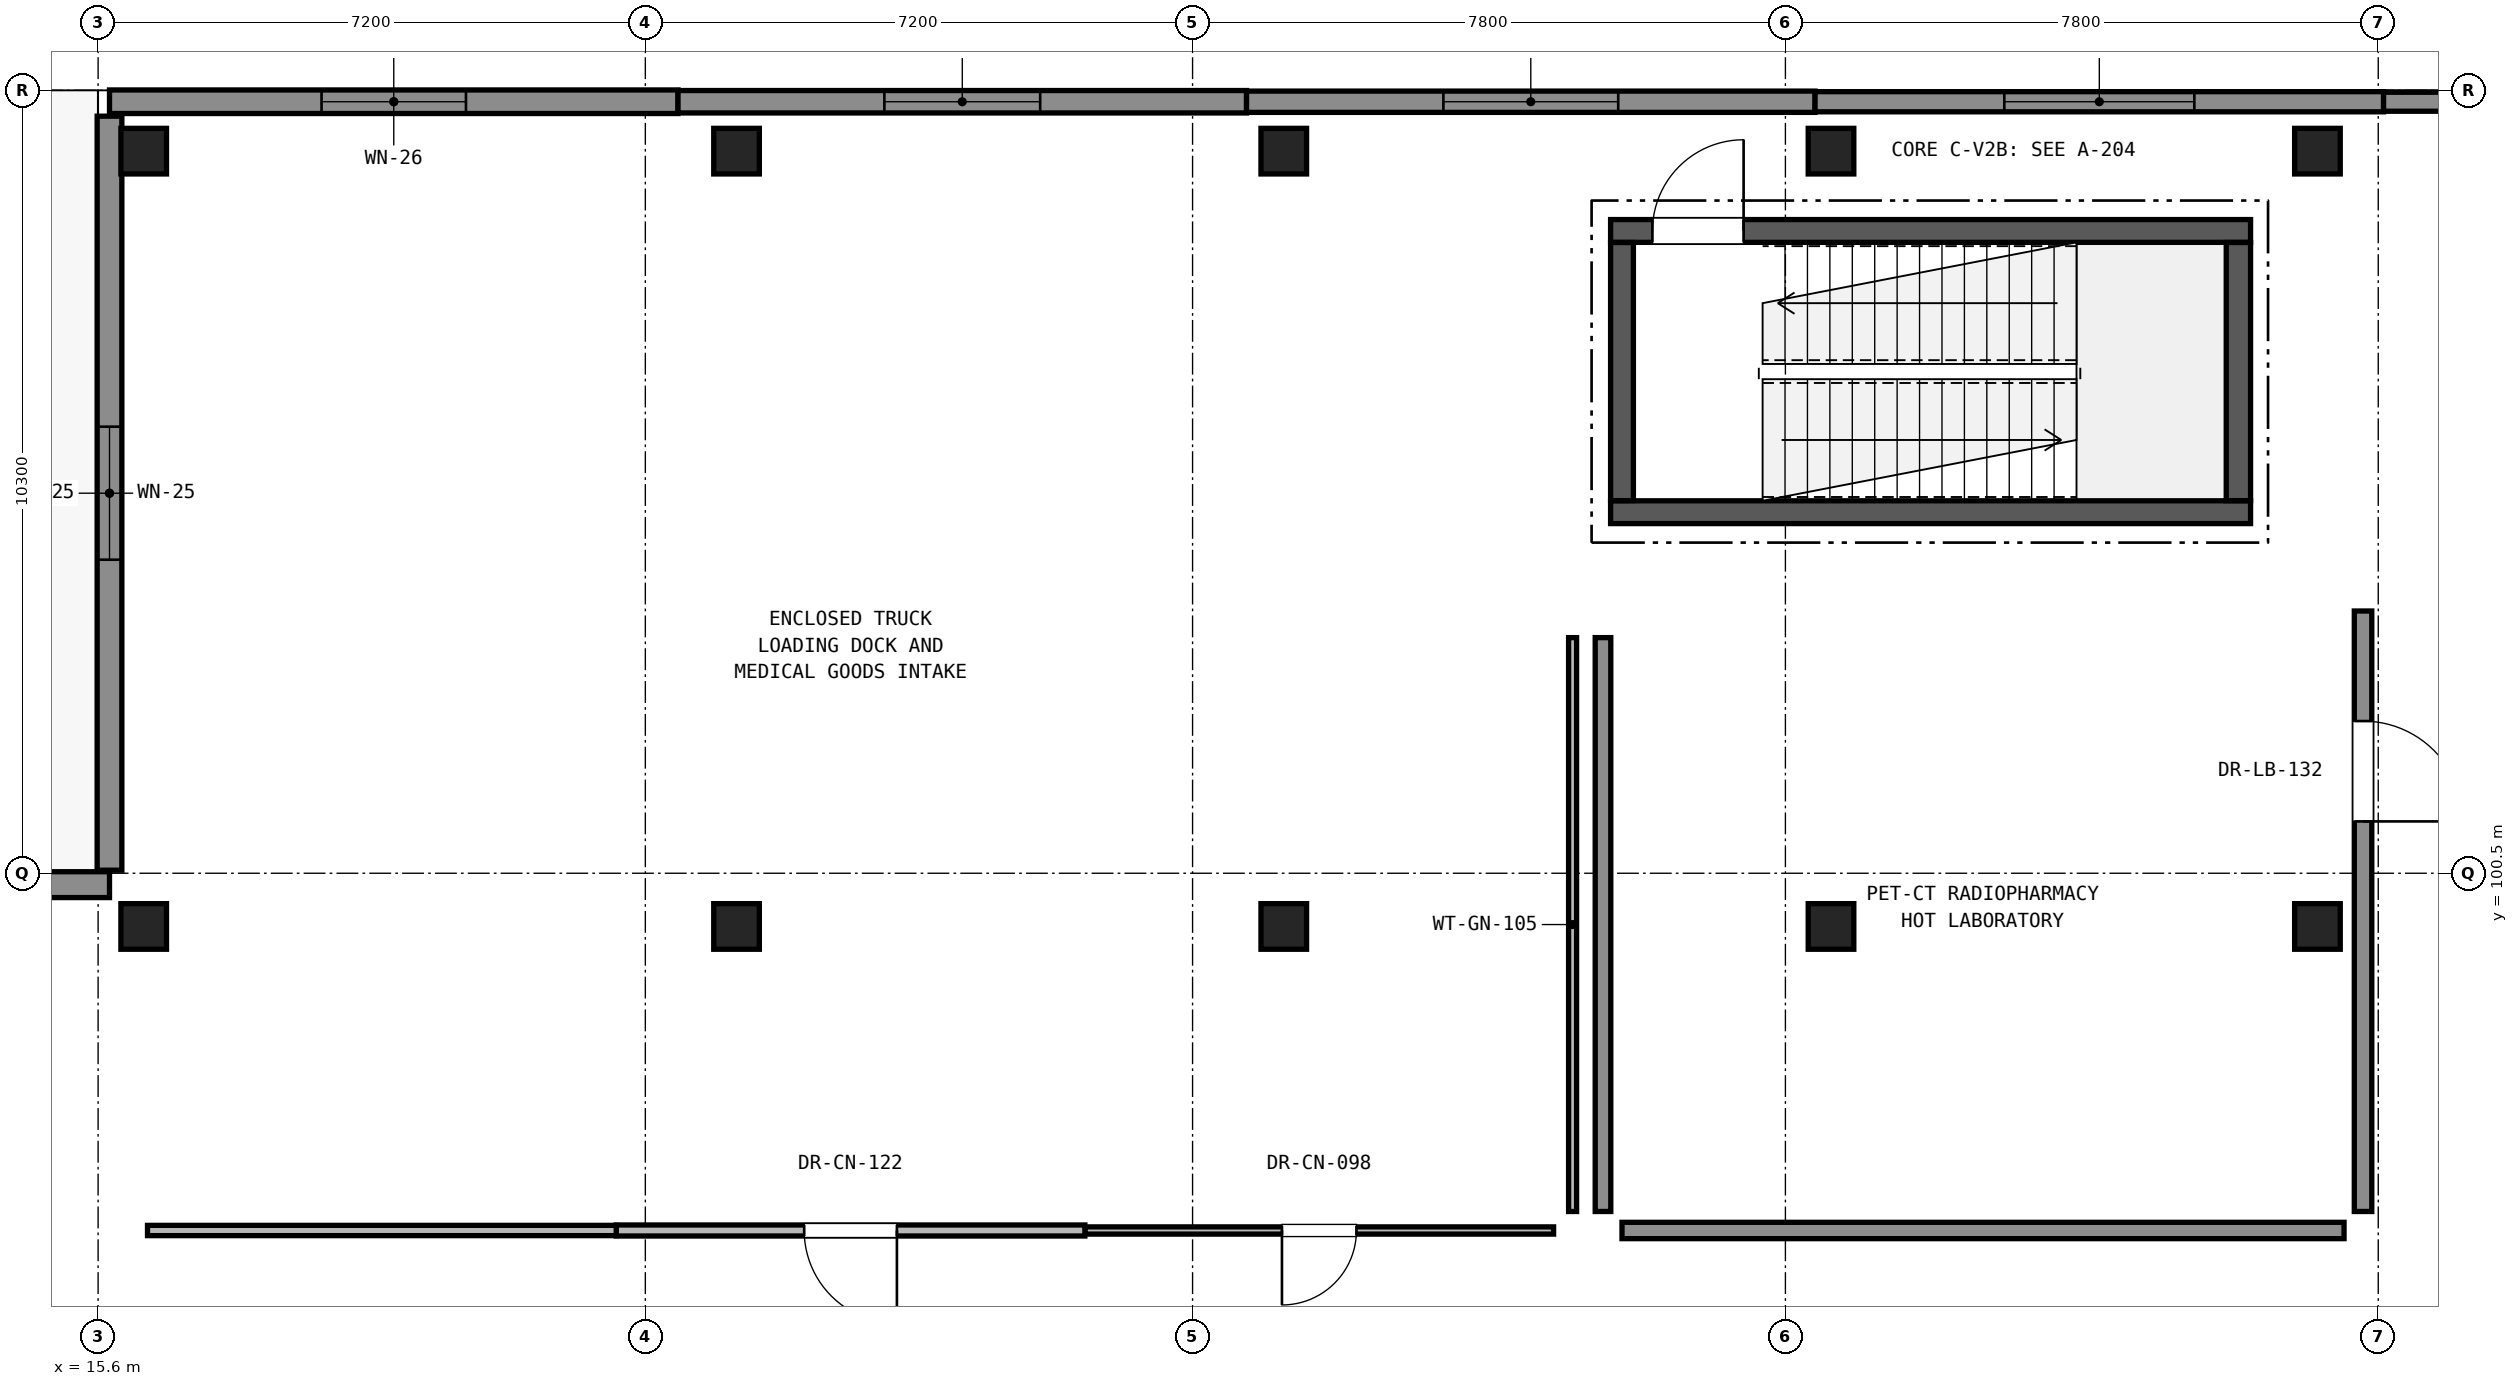
"""IFC4 building model, lengths in metres.
Left out: names, types, materials, properties, quantities, classifications, styles, units other than length and angle.
Written with IfcOpenShell. Run it as: python <this file> out.ifc"""

import sys

from ifc_helpers import new_model, si_unit, direction, frame, frame_2d, origin, origin_2d, place, context, subcontext, project, spatial, rectangle, extrude, element, fill, save


model = new_model("IFC4")
c1 = context("Model", 3, precision=1e-05, world=origin(), true_north=direction((0.0, 1.0)))
c2 = subcontext(c1, "Body", "Model", "MODEL_VIEW")
j1 = project(units=[si_unit("LENGTHUNIT", "METRE"), si_unit("PLANEANGLEUNIT", "RADIAN")], contexts=[c1])
p1 = place(None, origin())
s1 = spatial("IfcSite", under=j1, at=p1, CompositionType="ELEMENT")
p2 = place(p1, origin())
s2 = spatial("IfcBuilding", under=s1, at=p2, CompositionType="ELEMENT")
p3 = place(p2, origin())
s3 = spatial("IfcBuildingStorey", under=s2, at=p3, CompositionType="ELEMENT", Elevation=0.0)
for number, where, z_axis, x_axis in (
    (1, (16.2, 99.8, 0.0), (0.0, 0.0, 1.0), (1.0, 0.0, 0.0)),
    (2, (16.2, 110.0, 0.0), (0.0, 0.0, 1.0), (1.0, 0.0, 0.0)),
    (3, (24.0, 99.8, 0.0), (0.0, 0.0, 1.0), (1.0, 0.0, 0.0)),
    (4, (24.0, 110.0, 0.0), (0.0, 0.0, 1.0), (1.0, 0.0, 0.0)),
    (5, (31.2, 99.8, 0.0), (0.0, 0.0, 1.0), (1.0, 0.0, 0.0)),
    (6, (31.2, 110.0, 0.0), (0.0, 0.0, 1.0), (1.0, 0.0, 0.0)),
    (7, (38.4, 99.8, 0.0), (0.0, 0.0, 1.0), (1.0, 0.0, 0.0)),
    (8, (38.4, 110.0, 0.0), (0.0, 0.0, 1.0), (1.0, 0.0, 0.0)),
    (9, (44.8, 99.8, 0.0), (0.0, 0.0, 1.0), (1.0, 0.0, 0.0)),
    (10, (44.8, 110.0, 0.0), (0.0, 0.0, 1.0), (1.0, 0.0, 0.0)),
):
    element("IfcColumn", number, at=place(p3, frame(where, z_axis=z_axis, x_axis=x_axis)), inside=s3, PredefinedType="COLUMN", context=c2, shape_type="SweptSolid", body=[
        extrude(rectangle(XDim=0.6, YDim=0.6, at=origin_2d()), origin(), (0.0, 0.0, 1.0), 5.1),
    ])
p4 = place(p3, frame((7.95, 100.35, 0.0), z_axis=(0.0, 0.0, 1.0), x_axis=(1.0, 0.0, 0.0)))
e11 = element("IfcWall", 11, at=p4, inside=s3, PredefinedType="SOLIDWALL", context=c2, shape_type="SweptSolid", body=[
    extrude(rectangle(XDim=7.8, YDim=0.34, at=frame_2d((3.9, 0.0))), origin(), (0.0, 0.0, 1.0), 4.785),
])
p5 = place(p4, frame((2.6, 0.0, 0.0)))
e12 = element("IfcOpeningElement", 12, at=p5, cuts=e11, PredefinedType="OPENING", context=c2, shape_type="SweptSolid", body=[
    extrude(rectangle(XDim=2.6, YDim=2.8, at=frame_2d((1.3, 1.4))), frame((0.0, 0.18, 0.0), z_axis=(0.0, -1.0, 0.0), x_axis=(1.0, 0.0, 0.0)), (0.0, 0.0, 1.0), 0.36),
])
p6 = place(p3, frame((15.75, 100.54, 0.0), z_axis=(0.0, 0.0, 1.0), x_axis=(0.0, 1.0, 0.0)))
e13 = element("IfcWall", 13, at=p6, inside=s3, PredefinedType="SOLIDWALL", context=c2, shape_type="SweptSolid", body=[
    extrude(rectangle(XDim=9.92, YDim=0.325, at=frame_2d((4.96, 0.0))), origin(), (0.0, 0.0, 1.0), 4.785),
])
p7 = place(p6, frame((4.085, 0.0, 0.9)))
e14 = element("IfcOpeningElement", 14, at=p7, cuts=e13, PredefinedType="OPENING", context=c2, shape_type="SweptSolid", body=[
    extrude(rectangle(XDim=1.75, YDim=2.0, at=frame_2d((0.875, 1.0))), frame((0.0, 0.172, 0.0), z_axis=(0.0, -1.0, 0.0), x_axis=(1.0, 0.0, 0.0)), (0.0, 0.0, 1.0), 0.345),
])
p8 = place(p3, frame((15.75, 110.65, 0.0), z_axis=(0.0, 0.0, 1.0), x_axis=(1.0, 0.0, 0.0)))
e15 = element("IfcWall", 15, at=p8, inside=s3, PredefinedType="SOLIDWALL", context=c2, shape_type="SweptSolid", body=[
    extrude(rectangle(XDim=7.48, YDim=0.31, at=frame_2d((3.74, 0.0))), origin(), (0.0, 0.0, 1.0), 4.785),
])
p9 = place(p8, frame((2.79, 0.0, 0.9)))
e16 = element("IfcOpeningElement", 16, at=p9, cuts=e15, PredefinedType="OPENING", context=c2, shape_type="SweptSolid", body=[
    extrude(rectangle(XDim=1.9, YDim=2.0, at=frame_2d((0.95, 1.0))), frame((0.0, 0.165, 0.0), z_axis=(0.0, -1.0, 0.0), x_axis=(1.0, 0.0, 0.0)), (0.0, 0.0, 1.0), 0.33),
])
p10 = place(p3, frame((23.23, 110.65, 0.0), z_axis=(0.0, 0.0, 1.0), x_axis=(1.0, 0.0, 0.0)))
e17 = element("IfcWall", 17, at=p10, inside=s3, PredefinedType="SOLIDWALL", context=c2, shape_type="SweptSolid", body=[
    extrude(rectangle(XDim=7.48, YDim=0.295, at=frame_2d((3.74, 0.0))), origin(), (0.0, 0.0, 1.0), 4.785),
])
p11 = place(p10, frame((2.715, 0.0, 0.9)))
e18 = element("IfcOpeningElement", 18, at=p11, cuts=e17, PredefinedType="OPENING", context=c2, shape_type="SweptSolid", body=[
    extrude(rectangle(XDim=2.05, YDim=2.0, at=frame_2d((1.025, 1.0))), frame((0.0, 0.157, 0.0), z_axis=(0.0, -1.0, 0.0), x_axis=(1.0, 0.0, 0.0)), (0.0, 0.0, 1.0), 0.315),
])
p12 = place(p3, frame((30.71, 110.65, 0.0), z_axis=(0.0, 0.0, 1.0), x_axis=(1.0, 0.0, 0.0)))
e19 = element("IfcWall", 19, at=p12, inside=s3, PredefinedType="SOLIDWALL", context=c2, shape_type="SweptSolid", body=[
    extrude(rectangle(XDim=7.48, YDim=0.28, at=frame_2d((3.74, 0.0))), origin(), (0.0, 0.0, 1.0), 4.785),
])
p13 = place(p12, frame((2.59, 0.0, 0.9)))
e20 = element("IfcOpeningElement", 20, at=p13, cuts=e19, PredefinedType="OPENING", context=c2, shape_type="SweptSolid", body=[
    extrude(rectangle(XDim=2.3, YDim=2.0, at=frame_2d((1.15, 1.0))), frame((0.0, 0.15, 0.0), z_axis=(0.0, -1.0, 0.0), x_axis=(1.0, 0.0, 0.0)), (0.0, 0.0, 1.0), 0.3),
])
p14 = place(p3, frame((38.19, 110.65, 0.0), z_axis=(0.0, 0.0, 1.0), x_axis=(1.0, 0.0, 0.0)))
e21 = element("IfcWall", 21, at=p14, inside=s3, PredefinedType="SOLIDWALL", context=c2, shape_type="SweptSolid", body=[
    extrude(rectangle(XDim=7.48, YDim=0.265, at=frame_2d((3.74, 0.0))), origin(), (0.0, 0.0, 1.0), 4.785),
])
p15 = place(p14, frame((2.49, 0.0, 0.9)))
e22 = element("IfcOpeningElement", 22, at=p15, cuts=e21, PredefinedType="OPENING", context=c2, shape_type="SweptSolid", body=[
    extrude(rectangle(XDim=2.5, YDim=2.0, at=frame_2d((1.25, 1.0))), frame((0.0, 0.142, 0.0), z_axis=(0.0, -1.0, 0.0), x_axis=(1.0, 0.0, 0.0)), (0.0, 0.0, 1.0), 0.285),
])
p16 = place(p3, frame((45.67, 110.65, 0.0), z_axis=(0.0, 0.0, 1.0), x_axis=(1.0, 0.0, 0.0)))
e23 = element("IfcWall", 23, at=p16, inside=s3, PredefinedType="SOLIDWALL", context=c2, shape_type="SweptSolid", body=[
    extrude(rectangle(XDim=7.48, YDim=0.25, at=frame_2d((3.74, 0.0))), origin(), (0.0, 0.0, 1.0), 4.785),
])
p17 = place(p16, frame((2.99, 0.0, 0.9)))
e24 = element("IfcOpeningElement", 24, at=p17, cuts=e23, PredefinedType="OPENING", context=c2, shape_type="SweptSolid", body=[
    extrude(rectangle(XDim=1.5, YDim=2.2, at=frame_2d((0.75, 1.1))), frame((0.0, 0.135, 0.0), z_axis=(0.0, -1.0, 0.0), x_axis=(1.0, 0.0, 0.0)), (0.0, 0.0, 1.0), 0.27),
])
p18 = place(p3, frame((35.5, 105.25, 0.0), z_axis=(0.0, 0.0, 1.0), x_axis=(1.0, 0.0, 0.0)))
e25 = element("IfcWall", 25, at=p18, inside=s3, PredefinedType="SHEAR", context=c2, shape_type="SweptSolid", body=[
    extrude(rectangle(XDim=8.42, YDim=0.3, at=frame_2d((4.21, 0.0))), origin(), (0.0, 0.0, 1.0), 4.785),
])
p19 = place(p3, frame((35.5, 108.95, 0.0), z_axis=(0.0, 0.0, 1.0), x_axis=(1.0, 0.0, 0.0)))
e26 = element("IfcWall", 26, at=p19, inside=s3, PredefinedType="SHEAR", context=c2, shape_type="SweptSolid", body=[
    extrude(rectangle(XDim=8.42, YDim=0.3, at=frame_2d((4.21, 0.0))), origin(), (0.0, 0.0, 1.0), 4.785),
])
p20 = place(p19, frame((0.55, 0.0, 0.0)))
e27 = element("IfcOpeningElement", 27, at=p20, cuts=e26, PredefinedType="OPENING", context=c2, shape_type="SweptSolid", body=[
    extrude(rectangle(XDim=1.2, YDim=2.2, at=frame_2d((0.6, 1.1))), frame((0.0, 0.16, 0.0), z_axis=(0.0, -1.0, 0.0), x_axis=(1.0, 0.0, 0.0)), (0.0, 0.0, 1.0), 0.32),
])
p21 = place(p3, frame((35.65, 105.402, 0.0), z_axis=(0.0, 0.0, 1.0), x_axis=(0.0, 1.0, 0.0)))
e28 = element("IfcWall", 28, at=p21, inside=s3, PredefinedType="SHEAR", context=c2, shape_type="SweptSolid", body=[
    extrude(rectangle(XDim=3.396, YDim=0.3, at=frame_2d((1.698, 0.0))), origin(), (0.0, 0.0, 1.0), 4.785),
])
p22 = place(p3, frame((43.76, 105.402, 0.0), z_axis=(0.0, 0.0, 1.0), x_axis=(0.0, 1.0, 0.0)))
e29 = element("IfcWall", 29, at=p22, inside=s3, PredefinedType="SHEAR", context=c2, shape_type="SweptSolid", body=[
    extrude(rectangle(XDim=3.396, YDim=0.32, at=frame_2d((1.698, 0.0))), origin(), (0.0, 0.0, 1.0), 4.785),
])
p23 = place(p3, frame((35.0, 103.6, 0.0), z_axis=(0.0, 0.0, 1.0), x_axis=(0.0, -1.0, 0.0)))
e30 = element("IfcWall", 30, at=p23, inside=s3, PredefinedType="PARTITIONING", context=c2, shape_type="SweptSolid", body=[
    extrude(rectangle(XDim=7.55, YDim=0.105, at=frame_2d((3.775, 0.0))), origin(), (0.0, 0.0, 1.0), 4.425),
])
p24 = place(p3, frame((34.75, 95.8, 0.0), z_axis=(0.0, 0.0, 1.0), x_axis=(-1.0, 0.0, 0.0)))
e31 = element("IfcWall", 31, at=p24, inside=s3, PredefinedType="PARTITIONING", context=c2, shape_type="SweptSolid", body=[
    extrude(rectangle(XDim=6.167, YDim=0.095, at=frame_2d((3.083, 0.0))), origin(), (0.0, 0.0, 1.0), 4.135),
])
p25 = place(p24, frame((2.594, 0.0, 0.0)))
e32 = element("IfcOpeningElement", 32, at=p25, cuts=e31, PredefinedType="OPENING", context=c2, shape_type="SweptSolid", body=[
    extrude(rectangle(XDim=0.98, YDim=2.15, at=frame_2d((0.49, 1.075))), frame((0.0, 0.057, 0.0), z_axis=(0.0, -1.0, 0.0), x_axis=(1.0, 0.0, 0.0)), (0.0, 0.0, 1.0), 0.115),
])
p26 = place(p3, frame((28.583, 95.8, 0.0), z_axis=(0.0, 0.0, 1.0), x_axis=(-1.0, 0.0, 0.0)))
e33 = element("IfcWall", 33, at=p26, inside=s3, PredefinedType="PARTITIONING", context=c2, shape_type="SweptSolid", body=[
    extrude(rectangle(XDim=6.166, YDim=0.145, at=frame_2d((3.083, 0.0))), origin(), (0.0, 0.0, 1.0), 3.985),
])
p27 = place(p26, frame((2.473, 0.0, 0.0)))
e34 = element("IfcOpeningElement", 34, at=p27, cuts=e33, PredefinedType="OPENING", context=c2, shape_type="SweptSolid", body=[
    extrude(rectangle(XDim=1.22, YDim=2.2, at=frame_2d((0.61, 1.1))), frame((0.0, 0.083, 0.0), z_axis=(0.0, -1.0, 0.0), x_axis=(1.0, 0.0, 0.0)), (0.0, 0.0, 1.0), 0.165),
])
p28 = place(p3, frame((22.417, 95.8, 0.0), z_axis=(0.0, 0.0, 1.0), x_axis=(-1.0, 0.0, 0.0)))
e35 = element("IfcWall", 35, at=p28, inside=s3, PredefinedType="PARTITIONING", context=c2, shape_type="SweptSolid", body=[
    extrude(rectangle(XDim=6.167, YDim=0.135, at=frame_2d((3.083, 0.0))), origin(), (0.0, 0.0, 1.0), 4.085),
])
p29 = place(p3, frame((45.4, 103.95, 0.0), z_axis=(0.0, 0.0, 1.0), x_axis=(0.0, -1.0, 0.0)))
e36 = element("IfcWall", 36, at=p29, inside=s3, PredefinedType="PARTITIONING", context=c2, shape_type="SweptSolid", body=[
    extrude(rectangle(XDim=7.9, YDim=0.23, at=frame_2d((3.95, 0.0))), origin(), (0.0, 0.0, 1.0), 4.169),
])
p30 = place(p29, frame((1.448, 0.0, 0.0)))
e37 = element("IfcOpeningElement", 37, at=p30, cuts=e36, PredefinedType="OPENING", context=c2, shape_type="SweptSolid", body=[
    extrude(rectangle(XDim=1.32, YDim=2.2, at=frame_2d((0.66, 1.1))), frame((0.0, 0.125, 0.0), z_axis=(0.0, -1.0, 0.0), x_axis=(1.0, 0.0, 0.0)), (0.0, 0.0, 1.0), 0.25),
])
p31 = place(p3, frame((45.15, 95.8, 0.0), z_axis=(0.0, 0.0, 1.0), x_axis=(-1.0, 0.0, 0.0)))
e38 = element("IfcWall", 38, at=p31, inside=s3, PredefinedType="PARTITIONING", context=c2, shape_type="SweptSolid", body=[
    extrude(rectangle(XDim=9.5, YDim=0.215, at=frame_2d((4.75, 0.0))), origin(), (0.0, 0.0, 1.0), 3.985),
])
p32 = place(p3, frame((35.4, 96.05, 0.0), z_axis=(0.0, 0.0, 1.0), x_axis=(0.0, 1.0, 0.0)))
e39 = element("IfcWall", 39, at=p32, inside=s3, PredefinedType="PARTITIONING", context=c2, shape_type="SweptSolid", body=[
    extrude(rectangle(XDim=7.55, YDim=0.205, at=frame_2d((3.775, 0.0))), origin(), (0.0, 0.0, 1.0), 4.425),
])
p33 = place(p7, origin())
e40 = element("IfcWindow", 40, at=p33, inside=s3, PartitioningType="SINGLE_PANEL", PredefinedType="WINDOW", context=c2, shape_type="SweptSolid", body=[
    extrude(rectangle(XDim=1.75, YDim=2.0, at=frame_2d((0.875, 1.0))), frame((0.0, 0.03, 0.0), z_axis=(0.0, -1.0, 0.0), x_axis=(1.0, 0.0, 0.0)), (0.0, 0.0, 1.0), 0.06),
])
fill(e14, e40)
p34 = place(p9, origin())
e41 = element("IfcWindow", 41, at=p34, inside=s3, PartitioningType="SINGLE_PANEL", PredefinedType="WINDOW", context=c2, shape_type="SweptSolid", body=[
    extrude(rectangle(XDim=1.9, YDim=2.0, at=frame_2d((0.95, 1.0))), frame((0.0, 0.03, 0.0), z_axis=(0.0, -1.0, 0.0), x_axis=(1.0, 0.0, 0.0)), (0.0, 0.0, 1.0), 0.06),
])
fill(e16, e41)
p35 = place(p11, origin())
e42 = element("IfcWindow", 42, at=p35, inside=s3, PartitioningType="SINGLE_PANEL", PredefinedType="WINDOW", context=c2, shape_type="SweptSolid", body=[
    extrude(rectangle(XDim=2.05, YDim=2.0, at=frame_2d((1.025, 1.0))), frame((0.0, 0.03, 0.0), z_axis=(0.0, -1.0, 0.0), x_axis=(1.0, 0.0, 0.0)), (0.0, 0.0, 1.0), 0.06),
])
fill(e18, e42)
p36 = place(p13, origin())
e43 = element("IfcWindow", 43, at=p36, inside=s3, PartitioningType="SINGLE_PANEL", PredefinedType="WINDOW", context=c2, shape_type="SweptSolid", body=[
    extrude(rectangle(XDim=2.3, YDim=2.0, at=frame_2d((1.15, 1.0))), frame((0.0, 0.03, 0.0), z_axis=(0.0, -1.0, 0.0), x_axis=(1.0, 0.0, 0.0)), (0.0, 0.0, 1.0), 0.06),
])
fill(e20, e43)
p37 = place(p15, origin())
e44 = element("IfcWindow", 44, at=p37, inside=s3, PartitioningType="SINGLE_PANEL", PredefinedType="WINDOW", context=c2, shape_type="SweptSolid", body=[
    extrude(rectangle(XDim=2.5, YDim=2.0, at=frame_2d((1.25, 1.0))), frame((0.0, 0.03, 0.0), z_axis=(0.0, -1.0, 0.0), x_axis=(1.0, 0.0, 0.0)), (0.0, 0.0, 1.0), 0.06),
])
fill(e22, e44)
p38 = place(p20, origin())
e45 = element("IfcDoor", 45, at=p38, inside=s3, OperationType="SINGLE_SWING_RIGHT", PredefinedType="DOOR", context=c2, shape_type="SweptSolid", body=[
    extrude(rectangle(XDim=1.2, YDim=2.2, at=frame_2d((0.6, 1.1))), frame((0.0, 0.025, 0.0), z_axis=(0.0, -1.0, 0.0), x_axis=(1.0, 0.0, 0.0)), (0.0, 0.0, 1.0), 0.05),
])
fill(e27, e45)
p39 = place(p25, origin())
e46 = element("IfcDoor", 46, at=p39, inside=s3, OperationType="SINGLE_SWING_RIGHT", PredefinedType="DOOR", context=c2, shape_type="SweptSolid", body=[
    extrude(rectangle(XDim=0.98, YDim=2.15, at=frame_2d((0.49, 1.075))), frame((0.0, 0.025, 0.0), z_axis=(0.0, -1.0, 0.0), x_axis=(1.0, 0.0, 0.0)), (0.0, 0.0, 1.0), 0.05),
])
fill(e32, e46)
p40 = place(p27, origin())
e47 = element("IfcDoor", 47, at=p40, inside=s3, OperationType="SINGLE_SWING_LEFT", PredefinedType="DOOR", context=c2, shape_type="SweptSolid", body=[
    extrude(rectangle(XDim=1.22, YDim=2.2, at=frame_2d((0.61, 1.1))), frame((0.0, 0.025, 0.0), z_axis=(0.0, -1.0, 0.0), x_axis=(1.0, 0.0, 0.0)), (0.0, 0.0, 1.0), 0.05),
])
fill(e34, e47)
p41 = place(p30, origin())
e48 = element("IfcDoor", 48, at=p41, inside=s3, OperationType="SINGLE_SWING_RIGHT", PredefinedType="DOOR", context=c2, shape_type="SweptSolid", body=[
    extrude(rectangle(XDim=1.32, YDim=2.2, at=frame_2d((0.66, 1.1))), frame((0.0, 0.025, 0.0), z_axis=(0.0, -1.0, 0.0), x_axis=(1.0, 0.0, 0.0)), (0.0, 0.0, 1.0), 0.05),
])
fill(e37, e48)
save(model, sys.argv[1])
